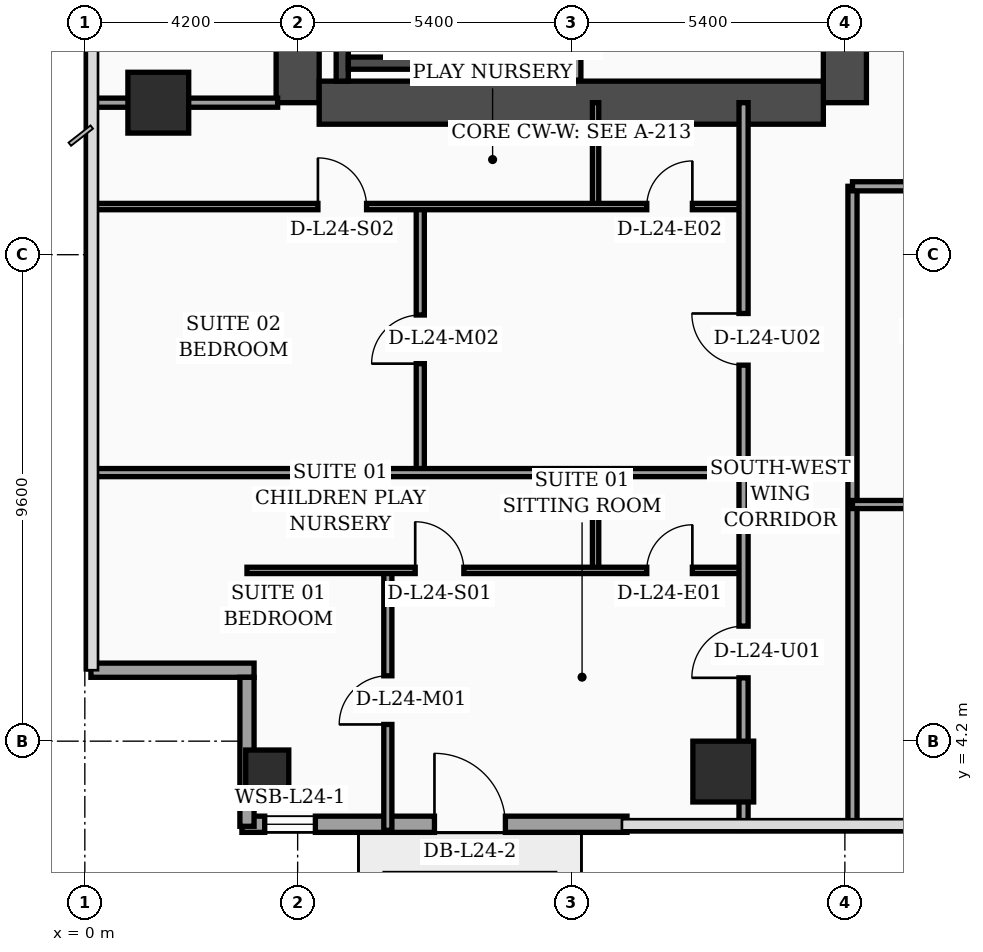
"""IFC4 building model, lengths in metres.
Left out: names, types, materials, properties, quantities, classifications, styles, units other than length and angle.
Written with IfcOpenShell. Run it as: python <this file> out.ifc"""

import sys

from ifc_helpers import new_model, si_unit, direction, frame, frame_2d, origin, origin_2d, place, context, subcontext, project, spatial, rectangle, hollow_rectangle, extrude, element, fill, save


model = new_model("IFC4")
c1 = context("Model", 3, precision=1e-05, world=origin(), true_north=direction((0.0, 1.0)))
c2 = subcontext(c1, "Body", "Model", "MODEL_VIEW")
j1 = project(units=[si_unit("LENGTHUNIT", "METRE"), si_unit("PLANEANGLEUNIT", "RADIAN")], contexts=[c1])
p1 = place(None, origin())
s1 = spatial("IfcSite", under=j1, at=p1, CompositionType="ELEMENT")
p2 = place(p1, origin())
s2 = spatial("IfcBuilding", under=s1, at=p2, CompositionType="ELEMENT")
p3 = place(p2, frame((0.0, 0.0, 101.2)))
s3 = spatial("IfcBuildingStorey", under=s2, at=p3, CompositionType="ELEMENT", Elevation=101.2)
p4 = place(p3, frame((4.2, 16.8, 0.0), z_axis=(0.0, 0.0, 1.0), x_axis=(0.0, 1.0, 0.0)))
e1 = element("IfcWall", 1, at=p4, inside=s3, PredefinedType="SHEAR", context=c2, shape_type="SweptSolid", body=[
    extrude(rectangle(XDim=21.6, YDim=0.85, at=frame_2d((10.8, 0.0))), origin(), (0.0, 0.0, 1.0), 3.56),
])
p5 = place(p3, frame((15.0, 16.8, 0.0), z_axis=(0.0, 0.0, 1.0), x_axis=(0.0, 1.0, 0.0)))
e2 = element("IfcWall", 2, at=p5, inside=s3, PredefinedType="SHEAR", context=c2, shape_type="SweptSolid", body=[
    extrude(rectangle(XDim=21.6, YDim=0.85, at=frame_2d((10.8, 0.0))), origin(), (0.0, 0.0, 1.0), 3.56),
])
p6 = place(p5, frame((8.65, 0.0, 0.0)))
e3 = element("IfcOpeningElement", 3, at=p6, cuts=e2, PredefinedType="OPENING", context=c2, shape_type="SweptSolid", body=[
    extrude(rectangle(XDim=1.1, YDim=2.2, at=frame_2d((0.55, 1.1))), frame((0.0, 0.435, 0.0), z_axis=(0.0, -1.0, 0.0), x_axis=(1.0, 0.0, 0.0)), (0.0, 0.0, 1.0), 0.87),
])
p7 = place(p5, frame((10.85, 0.0, 0.0)))
e4 = element("IfcOpeningElement", 4, at=p7, cuts=e2, PredefinedType="OPENING", context=c2, shape_type="SweptSolid", body=[
    extrude(rectangle(XDim=1.1, YDim=2.2, at=frame_2d((0.55, 1.1))), frame((0.0, 0.435, 0.0), z_axis=(0.0, -1.0, 0.0), x_axis=(1.0, 0.0, 0.0)), (0.0, 0.0, 1.0), 0.87),
])
p8 = place(p5, frame((13.5, 0.0, 0.0)))
e5 = element("IfcOpeningElement", 5, at=p8, cuts=e2, PredefinedType="OPENING", context=c2, shape_type="SweptSolid", body=[
    extrude(rectangle(XDim=1.1, YDim=2.2, at=frame_2d((0.55, 1.1))), frame((0.0, 0.435, 0.0), z_axis=(0.0, -1.0, 0.0), x_axis=(1.0, 0.0, 0.0)), (0.0, 0.0, 1.0), 0.87),
])
p9 = place(p5, frame((16.15, 0.0, 0.0)))
e6 = element("IfcOpeningElement", 6, at=p9, cuts=e2, PredefinedType="OPENING", context=c2, shape_type="SweptSolid", body=[
    extrude(rectangle(XDim=1.1, YDim=2.2, at=frame_2d((0.55, 1.1))), frame((0.0, 0.435, 0.0), z_axis=(0.0, -1.0, 0.0), x_axis=(1.0, 0.0, 0.0)), (0.0, 0.0, 1.0), 0.87),
])
p10 = place(p3, frame((4.625, 16.8, 0.0), z_axis=(0.0, 0.0, 1.0), x_axis=(1.0, 0.0, 0.0)))
e7 = element("IfcWall", 7, at=p10, inside=s3, PredefinedType="SHEAR", context=c2, shape_type="SweptSolid", body=[
    extrude(rectangle(XDim=9.95, YDim=0.85, at=frame_2d((4.975, 0.0))), origin(), (0.0, 0.0, 1.0), 3.56),
])
p11 = place(p3, frame((5.08, 17.225, 0.0), z_axis=(0.0, 0.0, 1.0), x_axis=(0.0, 1.0, 0.0)))
e8 = element("IfcWall", 8, at=p11, inside=s3, PredefinedType="SOLIDWALL", context=c2, shape_type="SweptSolid", body=[
    extrude(rectangle(XDim=9.565, YDim=0.24, at=frame_2d((4.782, 0.0))), origin(), (0.0, 0.0, 1.0), 3.56),
])
p12 = place(p3, frame((8.42, 17.225, 0.0), z_axis=(0.0, 0.0, 1.0), x_axis=(0.0, 1.0, 0.0)))
e9 = element("IfcWall", 9, at=p12, inside=s3, PredefinedType="SOLIDWALL", context=c2, shape_type="SweptSolid", body=[
    extrude(rectangle(XDim=9.565, YDim=0.24, at=frame_2d((4.782, 0.0))), origin(), (0.0, 0.0, 1.0), 3.56),
])
p13 = place(p12, frame((0.35, 0.0, 0.0)))
e10 = element("IfcOpeningElement", 10, at=p13, cuts=e9, PredefinedType="OPENING", context=c2, shape_type="SweptSolid", body=[
    extrude(rectangle(XDim=1.15, YDim=2.2, at=frame_2d((0.575, 1.1))), frame((0.0, 0.13, 0.0), z_axis=(0.0, -1.0, 0.0), x_axis=(1.0, 0.0, 0.0)), (0.0, 0.0, 1.0), 0.26),
])
p14 = place(p3, frame((5.2, 17.58, 0.0), z_axis=(0.0, 0.0, 1.0), x_axis=(1.0, 0.0, 0.0)))
e11 = element("IfcWall", 11, at=p14, inside=s3, PredefinedType="SOLIDWALL", context=c2, shape_type="SweptSolid", body=[
    extrude(rectangle(XDim=3.1, YDim=0.24, at=frame_2d((1.55, 0.0))), origin(), (0.0, 0.0, 1.0), 3.56),
])
p15 = place(p3, frame((3.6, 3.6, 0.0), z_axis=(0.0, 0.0, 1.0), x_axis=(1.0, 0.0, 0.0)))
e12 = element("IfcColumn", 12, at=p15, inside=s3, PredefinedType="COLUMN", context=c2, shape_type="SweptSolid", body=[
    extrude(hollow_rectangle(XDim=0.85, YDim=0.85, WallThickness=0.036, at=origin_2d()), origin(), (0.0, 0.0, 1.0), 3.56),
])
for number, where, z_axis, x_axis in (
    (13, (1.45, 16.8, 0.0), (0.0, 0.0, 1.0), (1.0, 0.0, 0.0)),
    (14, (12.6, 3.6, 0.0), (0.0, 0.0, 1.0), (1.0, 0.0, 0.0)),
):
    element("IfcColumn", number, at=place(p3, frame(where, z_axis=z_axis, x_axis=x_axis)), inside=s3, PredefinedType="COLUMN", context=c2, shape_type="SweptSolid", body=[
        extrude(rectangle(XDim=1.2, YDim=1.2, at=origin_2d()), origin(), (0.0, 0.0, 1.0), 3.56),
    ])
p16 = place(p3, frame((3.1, 2.56, 0.0), z_axis=(0.0, 0.0, 1.0), x_axis=(1.0, 0.0, 0.0)))
e15 = element("IfcWall", 15, at=p16, inside=s3, PredefinedType="SOLIDWALL", context=c2, shape_type="SweptSolid", body=[
    extrude(rectangle(XDim=7.6, YDim=0.32, at=frame_2d((3.8, 0.0))), origin(), (0.0, 0.0, 1.0), 3.56),
])
p17 = place(p16, frame((0.45, 0.0, 0.75)))
e16 = element("IfcOpeningElement", 16, at=p17, cuts=e15, PredefinedType="OPENING", context=c2, shape_type="SweptSolid", body=[
    extrude(rectangle(XDim=1.0, YDim=1.6, at=frame_2d((0.5, 0.8))), frame((0.0, 0.17, 0.0), z_axis=(0.0, -1.0, 0.0), x_axis=(1.0, 0.0, 0.0)), (0.0, 0.0, 1.0), 0.34),
])
p18 = place(p16, frame((3.8, 0.0, 0.0)))
e17 = element("IfcOpeningElement", 17, at=p18, cuts=e15, PredefinedType="OPENING", context=c2, shape_type="SweptSolid", body=[
    extrude(rectangle(XDim=1.4, YDim=2.25, at=frame_2d((0.7, 1.125))), frame((0.0, 0.17, 0.0), z_axis=(0.0, -1.0, 0.0), x_axis=(1.0, 0.0, 0.0)), (0.0, 0.0, 1.0), 0.34),
])
p19 = place(p3, frame((0.12, 5.6, 0.0), z_axis=(0.0, 0.0, 1.0), x_axis=(1.0, 0.0, 0.0)))
e18 = element("IfcWall", 18, at=p19, inside=s3, PredefinedType="SOLIDWALL", context=c2, shape_type="SweptSolid", body=[
    extrude(rectangle(XDim=3.22, YDim=0.28, at=frame_2d((1.61, 0.0))), origin(), (0.0, 0.0, 1.0), 2.84),
])
p20 = place(p3, frame((3.2, 5.46, 0.0), z_axis=(0.0, 0.0, 1.0), x_axis=(0.0, -1.0, 0.0)))
e19 = element("IfcWall", 19, at=p20, inside=s3, PredefinedType="SOLIDWALL", context=c2, shape_type="SweptSolid", body=[
    extrude(rectangle(XDim=2.94, YDim=0.28, at=frame_2d((1.47, 0.0))), origin(), (0.0, 0.0, 1.0), 2.84),
])
p21 = place(p3, frame((9.68, 17.245, 0.0), z_axis=(0.0, 0.0, 1.0), x_axis=(0.0, 1.0, 0.0)))
e20 = element("IfcWall", 20, at=p21, inside=s3, PredefinedType="SOLIDWALL", context=c2, shape_type="SweptSolid", body=[
    extrude(rectangle(XDim=7.755, YDim=0.22, at=frame_2d((3.877, 0.0))), origin(), (0.0, 0.0, 1.0), 3.56),
])
p22 = place(p3, frame((0.08, 16.8, 0.0), z_axis=(0.0, 0.0, 1.0), x_axis=(1.0, 0.0, 0.0)))
e21 = element("IfcWall", 21, at=p22, inside=s3, PredefinedType="PARTITIONING", context=c2, shape_type="SweptSolid", body=[
    extrude(rectangle(XDim=3.725, YDim=0.18, at=frame_2d((1.862, 0.0))), origin(), (0.0, 0.0, 1.0), 2.84),
])
p23 = place(p3, frame((10.08, 7.57, 0.0), z_axis=(0.0, 0.0, 1.0), x_axis=(0.0, 1.0, 0.0)))
e22 = element("IfcWall", 22, at=p23, inside=s3, PredefinedType="PARTITIONING", context=c2, shape_type="SweptSolid", body=[
    extrude(rectangle(XDim=1.93, YDim=0.125, at=frame_2d((0.965, 0.0))), origin(), (0.0, 0.0, 1.0), 3.09),
])
p24 = place(p3, frame((5.98, 2.44, 0.0), z_axis=(0.0, 0.0, 1.0), x_axis=(0.0, 1.0, 0.0)))
e23 = element("IfcWall", 23, at=p24, inside=s3, PredefinedType="PARTITIONING", context=c2, shape_type="SweptSolid", body=[
    extrude(rectangle(XDim=5.13, YDim=0.16, at=frame_2d((2.565, 0.0))), origin(), (0.0, 0.0, 1.0), 3.04),
])
p25 = place(p24, frame((2.09, 0.0, 0.0)))
e24 = element("IfcOpeningElement", 24, at=p25, cuts=e23, PredefinedType="OPENING", context=c2, shape_type="SweptSolid", body=[
    extrude(rectangle(XDim=0.96, YDim=2.2, at=frame_2d((0.48, 1.1))), frame((0.0, 0.09, 0.0), z_axis=(0.0, -1.0, 0.0), x_axis=(1.0, 0.0, 0.0)), (0.0, 0.0, 1.0), 0.18),
])
p26 = place(p3, frame((3.2, 7.57, 0.0), z_axis=(0.0, 0.0, 1.0), x_axis=(1.0, 0.0, 0.0)))
e25 = element("IfcWall", 25, at=p26, inside=s3, PredefinedType="PARTITIONING", context=c2, shape_type="SweptSolid", body=[
    extrude(rectangle(XDim=9.8, YDim=0.125, at=frame_2d((4.9, 0.0))), origin(), (0.0, 0.0, 1.0), 2.84),
])
p27 = place(p26, frame((3.32, 0.0, 0.0)))
e26 = element("IfcOpeningElement", 26, at=p27, cuts=e25, PredefinedType="OPENING", context=c2, shape_type="SweptSolid", body=[
    extrude(rectangle(XDim=0.96, YDim=2.2, at=frame_2d((0.48, 1.1))), frame((0.0, 0.073, 0.0), z_axis=(0.0, -1.0, 0.0), x_axis=(1.0, 0.0, 0.0)), (0.0, 0.0, 1.0), 0.145),
])
p28 = place(p26, frame((7.89, 0.0, 0.0)))
e27 = element("IfcOpeningElement", 27, at=p28, cuts=e25, PredefinedType="OPENING", context=c2, shape_type="SweptSolid", body=[
    extrude(rectangle(XDim=0.9, YDim=2.15, at=frame_2d((0.45, 1.075))), frame((0.0, 0.073, 0.0), z_axis=(0.0, -1.0, 0.0), x_axis=(1.0, 0.0, 0.0)), (0.0, 0.0, 1.0), 0.145),
])
p29 = place(p3, frame((10.08, 14.75, 0.0), z_axis=(0.0, 0.0, 1.0), x_axis=(0.0, 1.0, 0.0)))
e28 = element("IfcWall", 28, at=p29, inside=s3, PredefinedType="PARTITIONING", context=c2, shape_type="SweptSolid", body=[
    extrude(rectangle(XDim=2.05, YDim=0.125, at=frame_2d((1.025, 0.0))), origin(), (0.0, 0.0, 1.0), 3.56),
])
p30 = place(p3, frame((6.62, 9.5, 0.0), z_axis=(0.0, 0.0, 1.0), x_axis=(0.0, 1.0, 0.0)))
e29 = element("IfcWall", 29, at=p30, inside=s3, PredefinedType="PARTITIONING", context=c2, shape_type="SweptSolid", body=[
    extrude(rectangle(XDim=5.25, YDim=0.16, at=frame_2d((2.625, 0.0))), origin(), (0.0, 0.0, 1.0), 3.14),
])
p31 = place(p30, frame((2.15, 0.0, 0.0)))
e30 = element("IfcOpeningElement", 30, at=p31, cuts=e29, PredefinedType="OPENING", context=c2, shape_type="SweptSolid", body=[
    extrude(rectangle(XDim=0.96, YDim=2.2, at=frame_2d((0.48, 1.1))), frame((0.0, 0.09, 0.0), z_axis=(0.0, -1.0, 0.0), x_axis=(1.0, 0.0, 0.0)), (0.0, 0.0, 1.0), 0.18),
])
p32 = place(p3, frame((0.08, 14.75, 0.0), z_axis=(0.0, 0.0, 1.0), x_axis=(1.0, 0.0, 0.0)))
e31 = element("IfcWall", 31, at=p32, inside=s3, PredefinedType="PARTITIONING", context=c2, shape_type="SweptSolid", body=[
    extrude(rectangle(XDim=12.92, YDim=0.125, at=frame_2d((6.46, 0.0))), origin(), (0.0, 0.0, 1.0), 2.84),
])
p33 = place(p32, frame((4.52, 0.0, 0.0)))
e32 = element("IfcOpeningElement", 32, at=p33, cuts=e31, PredefinedType="OPENING", context=c2, shape_type="SweptSolid", body=[
    extrude(rectangle(XDim=0.96, YDim=2.2, at=frame_2d((0.48, 1.1))), frame((0.0, 0.073, 0.0), z_axis=(0.0, -1.0, 0.0), x_axis=(1.0, 0.0, 0.0)), (0.0, 0.0, 1.0), 0.145),
])
p34 = place(p32, frame((11.01, 0.0, 0.0)))
e33 = element("IfcOpeningElement", 33, at=p34, cuts=e31, PredefinedType="OPENING", context=c2, shape_type="SweptSolid", body=[
    extrude(rectangle(XDim=0.9, YDim=2.15, at=frame_2d((0.45, 1.075))), frame((0.0, 0.073, 0.0), z_axis=(0.0, -1.0, 0.0), x_axis=(1.0, 0.0, 0.0)), (0.0, 0.0, 1.0), 0.145),
])
p35 = place(p3, frame((0.08, 9.5, 0.0), z_axis=(0.0, 0.0, 1.0), x_axis=(1.0, 0.0, 0.0)))
e34 = element("IfcWall", 34, at=p35, inside=s3, PredefinedType="PARTITIONING", context=c2, shape_type="SweptSolid", body=[
    extrude(rectangle(XDim=12.92, YDim=0.16, at=frame_2d((6.46, 0.0))), origin(), (0.0, 0.0, 1.0), 2.84),
])
p36 = place(p3, frame((13.0, 2.44, 0.0), z_axis=(0.0, 0.0, 1.0), x_axis=(0.0, 1.0, 0.0)))
e35 = element("IfcWall", 35, at=p36, inside=s3, PredefinedType="PARTITIONING", context=c2, shape_type="SweptSolid", body=[
    extrude(rectangle(XDim=14.36, YDim=0.18, at=frame_2d((7.18, 0.0))), origin(), (0.0, 0.0, 1.0), 2.84),
])
p37 = place(p36, frame((3.01, 0.0, 0.0)))
e36 = element("IfcOpeningElement", 36, at=p37, cuts=e35, PredefinedType="OPENING", context=c2, shape_type="SweptSolid", body=[
    extrude(rectangle(XDim=1.02, YDim=2.2, at=frame_2d((0.51, 1.1))), frame((0.0, 0.1, 0.0), z_axis=(0.0, -1.0, 0.0), x_axis=(1.0, 0.0, 0.0)), (0.0, 0.0, 1.0), 0.2),
])
p38 = place(p36, frame((9.18, 0.0, 0.0)))
e37 = element("IfcOpeningElement", 37, at=p38, cuts=e35, PredefinedType="OPENING", context=c2, shape_type="SweptSolid", body=[
    extrude(rectangle(XDim=1.02, YDim=2.2, at=frame_2d((0.51, 1.1))), frame((0.0, 0.1, 0.0), z_axis=(0.0, -1.0, 0.0), x_axis=(1.0, 0.0, 0.0)), (0.0, 0.0, 1.0), 0.2),
])
p39 = place(p3, frame((15.15, 2.44, 0.0), z_axis=(0.0, 0.0, 1.0), x_axis=(0.0, 1.0, 0.0)))
e38 = element("IfcWall", 38, at=p39, inside=s3, PredefinedType="PARTITIONING", context=c2, shape_type="SweptSolid", body=[
    extrude(rectangle(XDim=12.71, YDim=0.18, at=frame_2d((6.355, 0.0))), origin(), (0.0, 0.0, 1.0), 3.04),
])
p40 = place(p3, frame((15.15, 8.87, 0.0), z_axis=(0.0, 0.0, 1.0), x_axis=(1.0, 0.0, 0.0)))
e39 = element("IfcWall", 39, at=p40, inside=s3, PredefinedType="PARTITIONING", context=c2, shape_type="SweptSolid", body=[
    extrude(rectangle(XDim=4.45, YDim=0.16, at=frame_2d((2.225, 0.0))), origin(), (0.0, 0.0, 1.0), 3.56),
])
p41 = place(p40, frame((1.75, 0.0, 0.0)))
e40 = element("IfcOpeningElement", 40, at=p41, cuts=e39, PredefinedType="OPENING", context=c2, shape_type="SweptSolid", body=[
    extrude(rectangle(XDim=0.96, YDim=2.2, at=frame_2d((0.48, 1.1))), frame((0.0, 0.09, 0.0), z_axis=(0.0, -1.0, 0.0), x_axis=(1.0, 0.0, 0.0)), (0.0, 0.0, 1.0), 0.18),
])
p42 = place(p3, frame((15.15, 15.15, 0.0), z_axis=(0.0, 0.0, 1.0), x_axis=(1.0, 0.0, 0.0)))
e41 = element("IfcWall", 41, at=p42, inside=s3, PredefinedType="PARTITIONING", context=c2, shape_type="SweptSolid", body=[
    extrude(rectangle(XDim=6.45, YDim=0.18, at=frame_2d((3.225, 0.0))), origin(), (0.0, 0.0, 1.0), 2.49),
])
p43 = place(p42, frame((1.74, 0.0, 0.0)))
e42 = element("IfcOpeningElement", 42, at=p43, cuts=e41, PredefinedType="OPENING", context=c2, shape_type="SweptSolid", body=[
    extrude(rectangle(XDim=1.02, YDim=2.2, at=frame_2d((0.51, 1.1))), frame((0.0, 0.1, 0.0), z_axis=(0.0, -1.0, 0.0), x_axis=(1.0, 0.0, 0.0)), (0.0, 0.0, 1.0), 0.2),
])
p44 = place(p17, origin())
e43 = element("IfcWindow", 43, at=p44, inside=s3, PartitioningType="SINGLE_PANEL", PredefinedType="WINDOW", context=c2, shape_type="SweptSolid", body=[
    extrude(rectangle(XDim=1.0, YDim=1.6, at=frame_2d((0.5, 0.8))), frame((0.0, 0.03, 0.0), z_axis=(0.0, -1.0, 0.0), x_axis=(1.0, 0.0, 0.0)), (0.0, 0.0, 1.0), 0.06),
])
fill(e16, e43)
p45 = place(p18, origin())
e44 = element("IfcDoor", 44, at=p45, inside=s3, OperationType="SINGLE_SWING_LEFT", PredefinedType="DOOR", context=c2, shape_type="SweptSolid", body=[
    extrude(rectangle(XDim=1.4, YDim=2.25, at=frame_2d((0.7, 1.125))), frame((0.0, 0.025, 0.0), z_axis=(0.0, -1.0, 0.0), x_axis=(1.0, 0.0, 0.0)), (0.0, 0.0, 1.0), 0.05),
])
fill(e17, e44)
p46 = place(p25, origin())
e45 = element("IfcDoor", 45, at=p46, inside=s3, OperationType="SINGLE_SWING_LEFT", PredefinedType="DOOR", context=c2, shape_type="SweptSolid", body=[
    extrude(rectangle(XDim=0.96, YDim=2.2, at=frame_2d((0.48, 1.1))), frame((0.0, 0.025, 0.0), z_axis=(0.0, -1.0, 0.0), x_axis=(1.0, 0.0, 0.0)), (0.0, 0.0, 1.0), 0.05),
])
fill(e24, e45)
p47 = place(p27, origin())
e46 = element("IfcDoor", 46, at=p47, inside=s3, OperationType="SINGLE_SWING_LEFT", PredefinedType="DOOR", context=c2, shape_type="SweptSolid", body=[
    extrude(rectangle(XDim=0.96, YDim=2.2, at=frame_2d((0.48, 1.1))), frame((0.0, 0.025, 0.0), z_axis=(0.0, -1.0, 0.0), x_axis=(1.0, 0.0, 0.0)), (0.0, 0.0, 1.0), 0.05),
])
fill(e26, e46)
p48 = place(p28, origin())
e47 = element("IfcDoor", 47, at=p48, inside=s3, OperationType="SINGLE_SWING_RIGHT", PredefinedType="DOOR", context=c2, shape_type="SweptSolid", body=[
    extrude(rectangle(XDim=0.9, YDim=2.15, at=frame_2d((0.45, 1.075))), frame((0.0, 0.025, 0.0), z_axis=(0.0, -1.0, 0.0), x_axis=(1.0, 0.0, 0.0)), (0.0, 0.0, 1.0), 0.05),
])
fill(e27, e47)
p49 = place(p31, origin())
e48 = element("IfcDoor", 48, at=p49, inside=s3, OperationType="SINGLE_SWING_LEFT", PredefinedType="DOOR", context=c2, shape_type="SweptSolid", body=[
    extrude(rectangle(XDim=0.96, YDim=2.2, at=frame_2d((0.48, 1.1))), frame((0.0, 0.025, 0.0), z_axis=(0.0, -1.0, 0.0), x_axis=(1.0, 0.0, 0.0)), (0.0, 0.0, 1.0), 0.05),
])
fill(e30, e48)
p50 = place(p33, origin())
e49 = element("IfcDoor", 49, at=p50, inside=s3, OperationType="SINGLE_SWING_LEFT", PredefinedType="DOOR", context=c2, shape_type="SweptSolid", body=[
    extrude(rectangle(XDim=0.96, YDim=2.2, at=frame_2d((0.48, 1.1))), frame((0.0, 0.025, 0.0), z_axis=(0.0, -1.0, 0.0), x_axis=(1.0, 0.0, 0.0)), (0.0, 0.0, 1.0), 0.05),
])
fill(e32, e49)
p51 = place(p34, origin())
e50 = element("IfcDoor", 50, at=p51, inside=s3, OperationType="SINGLE_SWING_RIGHT", PredefinedType="DOOR", context=c2, shape_type="SweptSolid", body=[
    extrude(rectangle(XDim=0.9, YDim=2.15, at=frame_2d((0.45, 1.075))), frame((0.0, 0.025, 0.0), z_axis=(0.0, -1.0, 0.0), x_axis=(1.0, 0.0, 0.0)), (0.0, 0.0, 1.0), 0.05),
])
fill(e33, e50)
p52 = place(p37, origin())
e51 = element("IfcDoor", 51, at=p52, inside=s3, OperationType="SINGLE_SWING_LEFT", PredefinedType="DOOR", context=c2, shape_type="SweptSolid", body=[
    extrude(rectangle(XDim=1.02, YDim=2.2, at=frame_2d((0.51, 1.1))), frame((0.0, 0.025, 0.0), z_axis=(0.0, -1.0, 0.0), x_axis=(1.0, 0.0, 0.0)), (0.0, 0.0, 1.0), 0.05),
])
fill(e36, e51)
p53 = place(p38, origin())
e52 = element("IfcDoor", 52, at=p53, inside=s3, OperationType="SINGLE_SWING_RIGHT", PredefinedType="DOOR", context=c2, shape_type="SweptSolid", body=[
    extrude(rectangle(XDim=1.02, YDim=2.2, at=frame_2d((0.51, 1.1))), frame((0.0, 0.025, 0.0), z_axis=(0.0, -1.0, 0.0), x_axis=(1.0, 0.0, 0.0)), (0.0, 0.0, 1.0), 0.05),
])
fill(e37, e52)
p54 = place(p13, origin())
e53 = element("IfcDoor", 53, at=p54, inside=s3, OperationType="SINGLE_SWING_LEFT", PredefinedType="DOOR", context=c2, shape_type="SweptSolid", body=[
    extrude(rectangle(XDim=1.15, YDim=2.2, at=frame_2d((0.575, 1.1))), frame((0.0, 0.025, 0.0), z_axis=(0.0, -1.0, 0.0), x_axis=(1.0, 0.0, 0.0)), (0.0, 0.0, 1.0), 0.05),
])
fill(e10, e53)
save(model, sys.argv[1])
